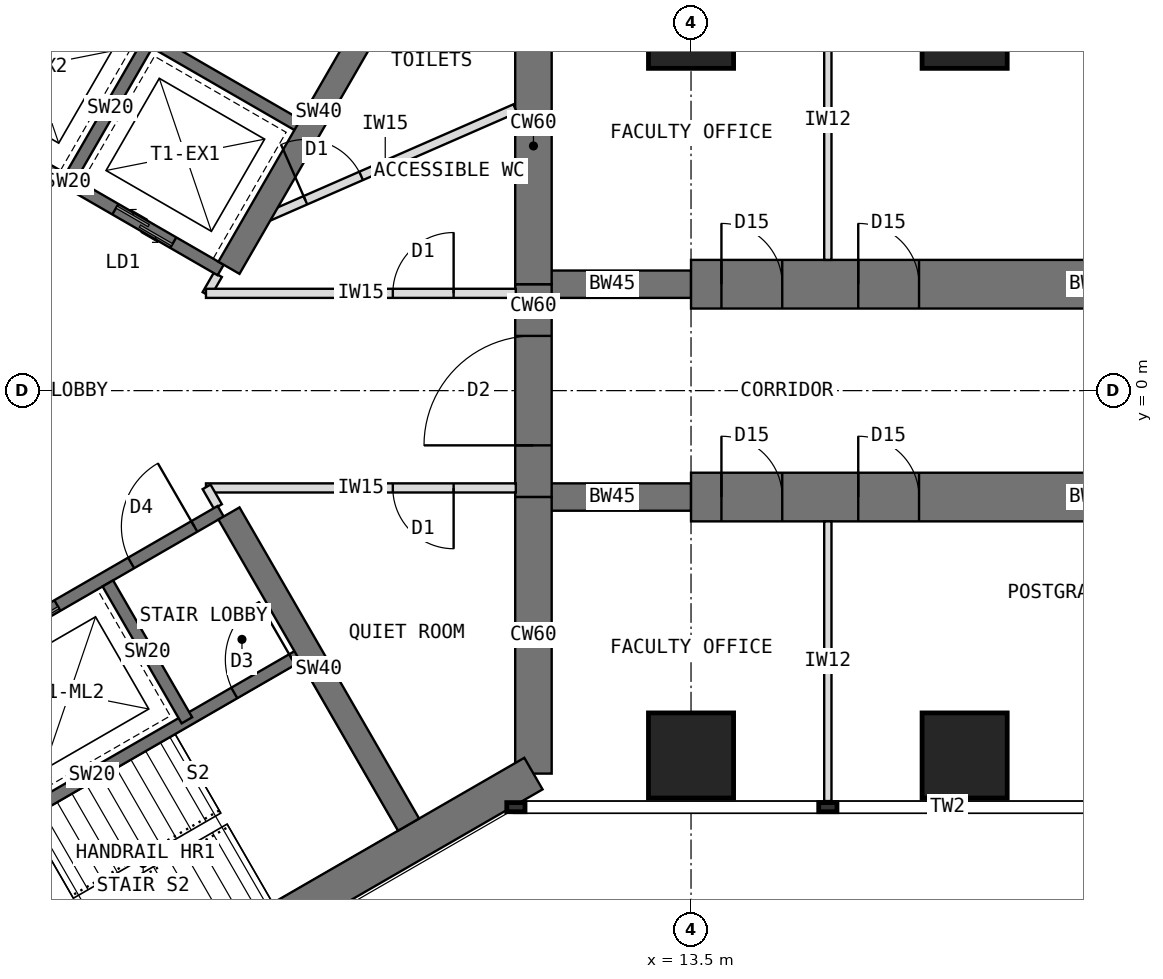
"""IFC4 building model, lengths in metres.
Left out: names, types, materials, properties, quantities, classifications, styles, units other than length and angle.
Written with IfcOpenShell. Run it as: python <this file> out.ifc"""

import sys

from ifc_helpers import new_model, si_unit, direction, frame, frame_2d, origin, origin_2d, place, context, subcontext, project, spatial, rectangle, extrude, element, fill, save


model = new_model("IFC4")
c1 = context("Model", 3, precision=1e-05, world=origin(), true_north=direction((0.0, 1.0)))
c2 = subcontext(c1, "Body", "Model", "MODEL_VIEW")
j1 = project(units=[si_unit("LENGTHUNIT", "METRE"), si_unit("PLANEANGLEUNIT", "RADIAN")], contexts=[c1])
p1 = place(None, origin())
s1 = spatial("IfcSite", under=j1, at=p1, CompositionType="ELEMENT")
p2 = place(p1, origin())
s2 = spatial("IfcBuilding", under=s1, at=p2, CompositionType="ELEMENT")
p3 = place(p2, frame((0.0, 0.0, 97.5)))
s3 = spatial("IfcBuildingStorey", under=s2, at=p3, CompositionType="ELEMENT", Elevation=97.5)
p4 = place(p3, frame((10.908, -6.298, 0.0), z_axis=(0.0, 0.0, 1.0), x_axis=(0.0, 1.0, 0.0)))
e1 = element("IfcWall", 1, at=p4, inside=s3, PredefinedType="SHEAR", context=c2, shape_type="SweptSolid", body=[
    extrude(rectangle(XDim=4.548, YDim=0.6, at=frame_2d((2.274, 0.0))), origin(), (0.0, 0.0, 1.0), 4.0),
])
p5 = place(p3, frame((10.908, -1.75, 0.0), z_axis=(0.0, 0.0, 1.0), x_axis=(0.0, 1.0, 0.0)))
e2 = element("IfcWall", 2, at=p5, inside=s3, PredefinedType="SHEAR", context=c2, shape_type="SweptSolid", body=[
    extrude(rectangle(XDim=3.5, YDim=0.6, at=frame_2d((1.75, 0.0))), origin(), (0.0, 0.0, 1.0), 4.0),
])
p6 = place(p5, frame((0.85, 0.0, 0.0)))
e3 = element("IfcOpeningElement", 3, at=p6, cuts=e2, PredefinedType="OPENING", context=c2, shape_type="SweptSolid", body=[
    extrude(rectangle(XDim=1.8, YDim=2.1, at=frame_2d((0.9, 1.05))), frame((0.0, 0.31, 0.0), z_axis=(0.0, -1.0, 0.0), x_axis=(1.0, 0.0, 0.0)), (0.0, 0.0, 1.0), 0.62),
])
p7 = place(p3, frame((10.908, 1.75, 0.0), z_axis=(0.0, 0.0, 1.0), x_axis=(0.0, 1.0, 0.0)))
e4 = element("IfcWall", 4, at=p7, inside=s3, PredefinedType="SHEAR", context=c2, shape_type="SweptSolid", body=[
    extrude(rectangle(XDim=4.548, YDim=0.6, at=frame_2d((2.274, 0.0))), origin(), (0.0, 0.0, 1.0), 4.0),
])
p8 = place(p3, frame((0.0, -12.596, 0.0), z_axis=(0.0, 0.0, 1.0), x_axis=(0.866021940709, 0.500005998175, 0.0)))
e5 = element("IfcWall", 5, at=p8, inside=s3, PredefinedType="SHEAR", context=c2, shape_type="SweptSolid", body=[
    extrude(rectangle(XDim=12.596, YDim=0.6, at=frame_2d((6.298, 0.0))), origin(), (0.0, 0.0, 1.0), 4.0),
])
p9 = place(p3, frame((10.908, 1.75, 0.0), z_axis=(0.0, 0.0, 1.0), x_axis=(1.0, 0.0, 0.0)))
e6 = element("IfcWall", 6, at=p9, inside=s3, PredefinedType="SHEAR", context=c2, shape_type="SweptSolid", body=[
    extrude(rectangle(XDim=2.592, YDim=0.45, at=frame_2d((1.296, 0.0))), origin(), (0.0, 0.0, 1.0), 4.0),
])
p10 = place(p3, frame((13.5, 1.75, 0.0), z_axis=(0.0, 0.0, 1.0), x_axis=(1.0, 0.0, 0.0)))
e7 = element("IfcWall", 7, at=p10, inside=s3, PredefinedType="SHEAR", context=c2, shape_type="SweptSolid", body=[
    extrude(rectangle(XDim=13.2, YDim=0.8, at=frame_2d((6.6, 0.0))), origin(), (0.0, 0.0, 1.0), 4.0),
])
p11 = place(p10, frame((0.5, 0.0, 0.0)))
e8 = element("IfcOpeningElement", 8, at=p11, cuts=e7, PredefinedType="OPENING", context=c2, shape_type="SweptSolid", body=[
    extrude(rectangle(XDim=1.0, YDim=2.1, at=frame_2d((0.5, 1.05))), frame((0.0, 0.41, 0.0), z_axis=(0.0, -1.0, 0.0), x_axis=(1.0, 0.0, 0.0)), (0.0, 0.0, 1.0), 0.82),
])
p12 = place(p10, frame((2.75, 0.0, 0.0)))
e9 = element("IfcOpeningElement", 9, at=p12, cuts=e7, PredefinedType="OPENING", context=c2, shape_type="SweptSolid", body=[
    extrude(rectangle(XDim=1.0, YDim=2.1, at=frame_2d((0.5, 1.05))), frame((0.0, 0.41, 0.0), z_axis=(0.0, -1.0, 0.0), x_axis=(1.0, 0.0, 0.0)), (0.0, 0.0, 1.0), 0.82),
])
p13 = place(p3, frame((10.908, -1.75, 0.0), z_axis=(0.0, 0.0, 1.0), x_axis=(1.0, 0.0, 0.0)))
e10 = element("IfcWall", 10, at=p13, inside=s3, PredefinedType="SHEAR", context=c2, shape_type="SweptSolid", body=[
    extrude(rectangle(XDim=2.592, YDim=0.45, at=frame_2d((1.296, 0.0))), origin(), (0.0, 0.0, 1.0), 4.0),
])
p14 = place(p3, frame((13.5, -1.75, 0.0), z_axis=(0.0, 0.0, 1.0), x_axis=(1.0, 0.0, 0.0)))
e11 = element("IfcWall", 11, at=p14, inside=s3, PredefinedType="SHEAR", context=c2, shape_type="SweptSolid", body=[
    extrude(rectangle(XDim=13.2, YDim=0.8, at=frame_2d((6.6, 0.0))), origin(), (0.0, 0.0, 1.0), 4.0),
])
p15 = place(p14, frame((0.5, 0.0, 0.0)))
e12 = element("IfcOpeningElement", 12, at=p15, cuts=e11, PredefinedType="OPENING", context=c2, shape_type="SweptSolid", body=[
    extrude(rectangle(XDim=1.0, YDim=2.1, at=frame_2d((0.5, 1.05))), frame((0.0, 0.41, 0.0), z_axis=(0.0, -1.0, 0.0), x_axis=(1.0, 0.0, 0.0)), (0.0, 0.0, 1.0), 0.82),
])
p16 = place(p14, frame((2.75, 0.0, 0.0)))
e13 = element("IfcOpeningElement", 13, at=p16, cuts=e11, PredefinedType="OPENING", context=c2, shape_type="SweptSolid", body=[
    extrude(rectangle(XDim=1.0, YDim=2.1, at=frame_2d((0.5, 1.05))), frame((0.0, 0.41, 0.0), z_axis=(0.0, -1.0, 0.0), x_axis=(1.0, 0.0, 0.0)), (0.0, 0.0, 1.0), 0.82),
])
for number, where, z_axis, x_axis in (
    (14, (13.5, 6.0, 0.0), (0.0, 0.0, 1.0), (1.0, 0.0, 0.0)),
    (15, (13.5, -6.0, 0.0), (0.0, 0.0, 1.0), (1.0, 0.0, 0.0)),
    (16, (18.0, 6.0, 0.0), (0.0, 0.0, 1.0), (1.0, 0.0, 0.0)),
    (17, (18.0, -6.0, 0.0), (0.0, 0.0, 1.0), (1.0, 0.0, 0.0)),
):
    element("IfcColumn", number, at=place(p3, frame(where, z_axis=z_axis, x_axis=x_axis)), inside=s3, PredefinedType="COLUMN", context=c2, shape_type="SweptSolid", body=[
        extrude(rectangle(XDim=1.4, YDim=1.4, at=origin_2d()), origin(), (0.0, 0.0, 1.0), 4.0),
    ])
p17 = place(p3, frame((5.764, 1.984, 0.0), z_axis=(0.0, 0.0, 1.0), x_axis=(-0.866026010844, 0.49999894854, 0.0)))
e18 = element("IfcWall", 18, at=p17, inside=s3, PredefinedType="SHEAR", context=c2, shape_type="SweptSolid", body=[
    extrude(rectangle(XDim=8.0, YDim=0.2, at=frame_2d((4.0, 0.0))), origin(), (0.0, 0.0, 1.0), 4.0),
])
p18 = place(p17, frame((6.3, 0.0, 0.0)))
e19 = element("IfcOpeningElement", 19, at=p18, cuts=e18, PredefinedType="OPENING", context=c2, shape_type="SweptSolid", body=[
    extrude(rectangle(XDim=1.2, YDim=2.1, at=frame_2d((0.6, 1.05))), frame((0.0, 0.11, 0.0), z_axis=(0.0, -1.0, 0.0), x_axis=(1.0, 0.0, 0.0)), (0.0, 0.0, 1.0), 0.22),
])
p19 = place(p17, frame((0.9, 0.0, 0.0)))
e20 = element("IfcOpeningElement", 20, at=p19, cuts=e18, PredefinedType="OPENING", context=c2, shape_type="SweptSolid", body=[
    extrude(rectangle(XDim=1.1, YDim=2.2, at=frame_2d((0.55, 1.1))), frame((0.0, 0.11, 0.0), z_axis=(0.0, -1.0, 0.0), x_axis=(1.0, 0.0, 0.0)), (0.0, 0.0, 1.0), 0.22),
])
p20 = place(p17, frame((3.8, 0.0, 0.0)))
e21 = element("IfcOpeningElement", 21, at=p20, cuts=e18, PredefinedType="OPENING", context=c2, shape_type="SweptSolid", body=[
    extrude(rectangle(XDim=1.1, YDim=2.2, at=frame_2d((0.55, 1.1))), frame((0.0, 0.11, 0.0), z_axis=(0.0, -1.0, 0.0), x_axis=(1.0, 0.0, 0.0)), (0.0, 0.0, 1.0), 0.22),
])
p21 = place(p3, frame((3.303, 3.52, 0.0), z_axis=(0.0, 0.0, 1.0), x_axis=(0.499936506574, 0.866062058628, 0.0)))
e22 = element("IfcWall", 22, at=p21, inside=s3, PredefinedType="SHEAR", context=c2, shape_type="SweptSolid", body=[
    extrude(rectangle(XDim=2.6, YDim=0.2, at=frame_2d((1.3, 0.0))), origin(), (0.0, 0.0, 1.0), 4.0),
])
p22 = place(p3, frame((7.114, 4.322, 0.0), z_axis=(0.0, 0.0, 1.0), x_axis=(-0.866026010844, 0.49999894854, 0.0)))
e23 = element("IfcWall", 23, at=p22, inside=s3, PredefinedType="SHEAR", context=c2, shape_type="SweptSolid", body=[
    extrude(rectangle(XDim=8.0, YDim=0.2, at=frame_2d((4.0, 0.0))), origin(), (0.0, 0.0, 1.0), 4.0),
])
p23 = place(p22, frame((6.8, 0.0, 0.0)))
e24 = element("IfcOpeningElement", 24, at=p23, cuts=e23, PredefinedType="OPENING", context=c2, shape_type="SweptSolid", body=[
    extrude(rectangle(XDim=0.9, YDim=2.1, at=frame_2d((0.45, 1.05))), frame((0.0, 0.11, 0.0), z_axis=(0.0, -1.0, 0.0), x_axis=(1.0, 0.0, 0.0)), (0.0, 0.0, 1.0), 0.22),
])
p24 = place(p3, frame((5.901, 2.02, 0.0), z_axis=(0.0, 0.0, 1.0), x_axis=(0.500027676417, 0.866009424208, 0.0)))
e25 = element("IfcWall", 25, at=p24, inside=s3, PredefinedType="SHEAR", context=c2, shape_type="SweptSolid", body=[
    extrude(rectangle(XDim=5.908, YDim=0.4, at=frame_2d((2.954, 0.0))), origin(), (0.0, 0.0, 1.0), 4.0),
])
p25 = place(p3, frame((-1.164, -5.984, 0.0), z_axis=(0.0, 0.0, 1.0), x_axis=(0.866026010844, 0.49999894854, 0.0)))
e26 = element("IfcWall", 26, at=p25, inside=s3, PredefinedType="SHEAR", context=c2, shape_type="SweptSolid", body=[
    extrude(rectangle(XDim=8.0, YDim=0.2, at=frame_2d((4.0, 0.0))), origin(), (0.0, 0.0, 1.0), 4.0),
])
p26 = place(p25, frame((6.3, 0.0, 0.0)))
e27 = element("IfcOpeningElement", 27, at=p26, cuts=e26, PredefinedType="OPENING", context=c2, shape_type="SweptSolid", body=[
    extrude(rectangle(XDim=1.2, YDim=2.1, at=frame_2d((0.6, 1.05))), frame((0.0, 0.11, 0.0), z_axis=(0.0, -1.0, 0.0), x_axis=(1.0, 0.0, 0.0)), (0.0, 0.0, 1.0), 0.22),
])
p27 = place(p25, frame((0.9, 0.0, 0.0)))
e28 = element("IfcOpeningElement", 28, at=p27, cuts=e26, PredefinedType="OPENING", context=c2, shape_type="SweptSolid", body=[
    extrude(rectangle(XDim=1.1, YDim=2.2, at=frame_2d((0.55, 1.1))), frame((0.0, 0.11, 0.0), z_axis=(0.0, -1.0, 0.0), x_axis=(1.0, 0.0, 0.0)), (0.0, 0.0, 1.0), 0.22),
])
p28 = place(p25, frame((3.8, 0.0, 0.0)))
e29 = element("IfcOpeningElement", 29, at=p28, cuts=e26, PredefinedType="OPENING", context=c2, shape_type="SweptSolid", body=[
    extrude(rectangle(XDim=1.1, YDim=2.2, at=frame_2d((0.55, 1.1))), frame((0.0, 0.11, 0.0), z_axis=(0.0, -1.0, 0.0), x_axis=(1.0, 0.0, 0.0)), (0.0, 0.0, 1.0), 0.22),
])
p29 = place(p3, frame((3.909, -3.17, 0.0), z_axis=(0.0, 0.0, 1.0), x_axis=(0.49997716683, -0.86603858612, 0.0)))
e30 = element("IfcWall", 30, at=p29, inside=s3, PredefinedType="SHEAR", context=c2, shape_type="SweptSolid", body=[
    extrude(rectangle(XDim=2.6, YDim=0.2, at=frame_2d((1.3, 0.0))), origin(), (0.0, 0.0, 1.0), 4.0),
])
p30 = place(p3, frame((0.186, -8.322, 0.0), z_axis=(0.0, 0.0, 1.0), x_axis=(0.866026010844, 0.49999894854, 0.0)))
e31 = element("IfcWall", 31, at=p30, inside=s3, PredefinedType="SHEAR", context=c2, shape_type="SweptSolid", body=[
    extrude(rectangle(XDim=8.0, YDim=0.2, at=frame_2d((4.0, 0.0))), origin(), (0.0, 0.0, 1.0), 4.0),
])
p31 = place(p30, frame((6.7, 0.0, 0.0)))
e32 = element("IfcOpeningElement", 32, at=p31, cuts=e31, PredefinedType="OPENING", context=c2, shape_type="SweptSolid", body=[
    extrude(rectangle(XDim=1.1, YDim=2.1, at=frame_2d((0.55, 1.05))), frame((0.0, 0.11, 0.0), z_axis=(0.0, -1.0, 0.0), x_axis=(1.0, 0.0, 0.0)), (0.0, 0.0, 1.0), 0.22),
])
p32 = place(p3, frame((5.901, -2.02, 0.0), z_axis=(0.0, 0.0, 1.0), x_axis=(0.500027676417, -0.866009424208, 0.0)))
e33 = element("IfcWall", 33, at=p32, inside=s3, PredefinedType="SHEAR", context=c2, shape_type="SweptSolid", body=[
    extrude(rectangle(XDim=5.908, YDim=0.4, at=frame_2d((2.954, 0.0))), origin(), (0.0, 0.0, 1.0), 4.0),
])
for number, where, z_axis, x_axis in (
    (34, (15.75, 2.15, 0.0), (0.0, 0.0, 1.0), (0.0, 1.0, 0.0)),
    (35, (15.75, -2.15, 0.0), (0.0, 0.0, 1.0), (0.0, -1.0, 0.0)),
):
    element("IfcWall", number, at=place(p3, frame(where, z_axis=z_axis, x_axis=x_axis)), inside=s3, PredefinedType="PARTITIONING", context=c2, shape_type="SweptSolid", body=[
        extrude(rectangle(XDim=4.6, YDim=0.12, at=frame_2d((2.3, 0.0))), origin(), (0.0, 0.0, 1.0), 3.8),
    ])
p33 = place(p3, frame((5.719, 1.906, 0.0), z_axis=(0.0, 0.0, 1.0), x_axis=(-0.499590185398, -0.866261881104, 0.0)))
e36 = element("IfcWall", 36, at=p33, inside=s3, PredefinedType="PARTITIONING", context=c2, shape_type="SweptSolid", body=[
    extrude(rectangle(XDim=0.373, YDim=0.15, at=frame_2d((0.187, 0.0))), origin(), (0.0, 0.0, 1.0), 3.8),
])
p34 = place(p3, frame((5.523, 1.6, 0.0), z_axis=(0.0, 0.0, 1.0), x_axis=(1.0, 0.0, 0.0)))
e37 = element("IfcWall", 37, at=p34, inside=s3, PredefinedType="PARTITIONING", context=c2, shape_type="SweptSolid", body=[
    extrude(rectangle(XDim=5.096, YDim=0.15, at=frame_2d((2.548, 0.0))), origin(), (0.0, 0.0, 1.0), 3.8),
])
p35 = place(p34, frame((3.073, 0.0, 0.0)))
e38 = element("IfcOpeningElement", 38, at=p35, cuts=e37, PredefinedType="OPENING", context=c2, shape_type="SweptSolid", body=[
    extrude(rectangle(XDim=1.0, YDim=2.1, at=frame_2d((0.5, 1.05))), frame((0.0, 0.085, 0.0), z_axis=(0.0, -1.0, 0.0), x_axis=(1.0, 0.0, 0.0)), (0.0, 0.0, 1.0), 0.17),
])
p36 = place(p3, frame((10.618, -1.6, 0.0), z_axis=(0.0, 0.0, 1.0), x_axis=(-1.0, 0.0, 0.0)))
e39 = element("IfcWall", 39, at=p36, inside=s3, PredefinedType="PARTITIONING", context=c2, shape_type="SweptSolid", body=[
    extrude(rectangle(XDim=5.096, YDim=0.15, at=frame_2d((2.548, 0.0))), origin(), (0.0, 0.0, 1.0), 3.8),
])
p37 = place(p36, frame((1.023, 0.0, 0.0)))
e40 = element("IfcOpeningElement", 40, at=p37, cuts=e39, PredefinedType="OPENING", context=c2, shape_type="SweptSolid", body=[
    extrude(rectangle(XDim=1.0, YDim=2.1, at=frame_2d((0.5, 1.05))), frame((0.0, 0.085, 0.0), z_axis=(0.0, -1.0, 0.0), x_axis=(1.0, 0.0, 0.0)), (0.0, 0.0, 1.0), 0.17),
])
p38 = place(p3, frame((5.533, -1.583, 0.0), z_axis=(0.0, 0.0, 1.0), x_axis=(0.499590185398, -0.866261881104, 0.0)))
e41 = element("IfcWall", 41, at=p38, inside=s3, PredefinedType="PARTITIONING", context=c2, shape_type="SweptSolid", body=[
    extrude(rectangle(XDim=0.373, YDim=0.15, at=frame_2d((0.187, 0.0))), origin(), (0.0, 0.0, 1.0), 3.8),
])
p39 = place(p3, frame((6.333, 2.77, 0.0), z_axis=(0.0, 0.0, 1.0), x_axis=(0.916207765353, 0.400703544664, 0.0)))
e42 = element("IfcWall", 42, at=p39, inside=s3, PredefinedType="PARTITIONING", context=c2, shape_type="SweptSolid", body=[
    extrude(rectangle(XDim=4.666, YDim=0.15, at=frame_2d((2.333, 0.0))), origin(), (0.0, 0.0, 1.0), 3.8),
])
p40 = place(p39, frame((0.9, 0.0, 0.0)))
e43 = element("IfcOpeningElement", 43, at=p40, cuts=e42, PredefinedType="OPENING", context=c2, shape_type="SweptSolid", body=[
    extrude(rectangle(XDim=1.0, YDim=2.1, at=frame_2d((0.5, 1.05))), frame((0.0, 0.085, 0.0), z_axis=(0.0, -1.0, 0.0), x_axis=(1.0, 0.0, 0.0)), (0.0, 0.0, 1.0), 0.17),
])
p41 = place(p19, origin())
e44 = element("IfcDoor", 44, at=p41, inside=s3, OperationType="DOUBLE_DOOR_SLIDING", PredefinedType="DOOR", context=c2, shape_type="SweptSolid", body=[
    extrude(rectangle(XDim=1.1, YDim=2.2, at=frame_2d((0.55, 1.1))), frame((0.0, 0.025, 0.0), z_axis=(0.0, -1.0, 0.0), x_axis=(1.0, 0.0, 0.0)), (0.0, 0.0, 1.0), 0.05),
])
fill(e20, e44)
p42 = place(p26, origin())
e45 = element("IfcDoor", 45, at=p42, inside=s3, OperationType="SINGLE_SWING_RIGHT", PredefinedType="DOOR", context=c2, shape_type="SweptSolid", body=[
    extrude(rectangle(XDim=1.2, YDim=2.1, at=frame_2d((0.6, 1.05))), frame((0.0, 0.025, 0.0), z_axis=(0.0, -1.0, 0.0), x_axis=(1.0, 0.0, 0.0)), (0.0, 0.0, 1.0), 0.05),
])
fill(e27, e45)
p43 = place(p28, origin())
e46 = element("IfcDoor", 46, at=p43, inside=s3, OperationType="DOUBLE_DOOR_SLIDING", PredefinedType="DOOR", context=c2, shape_type="SweptSolid", body=[
    extrude(rectangle(XDim=1.1, YDim=2.2, at=frame_2d((0.55, 1.1))), frame((0.0, 0.025, 0.0), z_axis=(0.0, -1.0, 0.0), x_axis=(1.0, 0.0, 0.0)), (0.0, 0.0, 1.0), 0.05),
])
fill(e29, e46)
p44 = place(p31, origin())
e47 = element("IfcDoor", 47, at=p44, inside=s3, OperationType="SINGLE_SWING_RIGHT", PredefinedType="DOOR", context=c2, shape_type="SweptSolid", body=[
    extrude(rectangle(XDim=1.1, YDim=2.1, at=frame_2d((0.55, 1.05))), frame((0.0, 0.025, 0.0), z_axis=(0.0, -1.0, 0.0), x_axis=(1.0, 0.0, 0.0)), (0.0, 0.0, 1.0), 0.05),
])
fill(e32, e47)
p45 = place(p6, origin())
e48 = element("IfcDoor", 48, at=p45, inside=s3, OperationType="DOUBLE_DOOR_DOUBLE_SWING", PredefinedType="DOOR", context=c2, shape_type="SweptSolid", body=[
    extrude(rectangle(XDim=1.72, YDim=2.06, at=frame_2d((0.9, 1.03))), frame((0.0, 0.025, 0.0), z_axis=(0.0, -1.0, 0.0), x_axis=(1.0, 0.0, 0.0)), (0.0, 0.0, 1.0), 0.05),
    extrude(rectangle(XDim=0.04, YDim=2.1, at=frame_2d((0.02, 1.05))), frame((0.0, 0.3, 0.0), z_axis=(0.0, -1.0, 0.0), x_axis=(1.0, 0.0, 0.0)), (0.0, 0.0, 1.0), 0.6),
    extrude(rectangle(XDim=0.04, YDim=2.1, at=frame_2d((1.78, 1.05))), frame((0.0, 0.3, 0.0), z_axis=(0.0, -1.0, 0.0), x_axis=(1.0, 0.0, 0.0)), (0.0, 0.0, 1.0), 0.6),
    extrude(rectangle(XDim=1.72, YDim=0.04, at=frame_2d((0.9, 2.08))), frame((0.0, 0.3, 0.0), z_axis=(0.0, -1.0, 0.0), x_axis=(1.0, 0.0, 0.0)), (0.0, 0.0, 1.0), 0.6),
])
fill(e3, e48)
p46 = place(p37, origin())
e49 = element("IfcDoor", 49, at=p46, inside=s3, OperationType="SINGLE_SWING_LEFT", PredefinedType="DOOR", context=c2, shape_type="SweptSolid", body=[
    extrude(rectangle(XDim=1.0, YDim=2.1, at=frame_2d((0.5, 1.05))), frame((0.0, 0.025, 0.0), z_axis=(0.0, -1.0, 0.0), x_axis=(1.0, 0.0, 0.0)), (0.0, 0.0, 1.0), 0.05),
])
fill(e40, e49)
p47 = place(p35, origin())
e50 = element("IfcDoor", 50, at=p47, inside=s3, OperationType="SINGLE_SWING_RIGHT", PredefinedType="DOOR", context=c2, shape_type="SweptSolid", body=[
    extrude(rectangle(XDim=1.0, YDim=2.1, at=frame_2d((0.5, 1.05))), frame((0.0, 0.025, 0.0), z_axis=(0.0, -1.0, 0.0), x_axis=(1.0, 0.0, 0.0)), (0.0, 0.0, 1.0), 0.05),
])
fill(e38, e50)
p48 = place(p40, origin())
e51 = element("IfcDoor", 51, at=p48, inside=s3, OperationType="SINGLE_SWING_LEFT", PredefinedType="DOOR", context=c2, shape_type="SweptSolid", body=[
    extrude(rectangle(XDim=1.0, YDim=2.1, at=frame_2d((0.5, 1.05))), frame((0.0, 0.025, 0.0), z_axis=(0.0, -1.0, 0.0), x_axis=(1.0, 0.0, 0.0)), (0.0, 0.0, 1.0), 0.05),
])
fill(e43, e51)
p49 = place(p11, origin())
e52 = element("IfcDoor", 52, at=p49, inside=s3, OperationType="SINGLE_SWING_LEFT", PredefinedType="DOOR", context=c2, shape_type="SweptSolid", body=[
    extrude(rectangle(XDim=0.92, YDim=2.06, at=frame_2d((0.5, 1.03))), frame((0.0, 0.025, 0.0), z_axis=(0.0, -1.0, 0.0), x_axis=(1.0, 0.0, 0.0)), (0.0, 0.0, 1.0), 0.05),
    extrude(rectangle(XDim=0.04, YDim=2.1, at=frame_2d((0.02, 1.05))), frame((0.0, 0.4, 0.0), z_axis=(0.0, -1.0, 0.0), x_axis=(1.0, 0.0, 0.0)), (0.0, 0.0, 1.0), 0.8),
    extrude(rectangle(XDim=0.04, YDim=2.1, at=frame_2d((0.98, 1.05))), frame((0.0, 0.4, 0.0), z_axis=(0.0, -1.0, 0.0), x_axis=(1.0, 0.0, 0.0)), (0.0, 0.0, 1.0), 0.8),
    extrude(rectangle(XDim=0.92, YDim=0.04, at=frame_2d((0.5, 2.08))), frame((0.0, 0.4, 0.0), z_axis=(0.0, -1.0, 0.0), x_axis=(1.0, 0.0, 0.0)), (0.0, 0.0, 1.0), 0.8),
])
fill(e8, e52)
p50 = place(p12, origin())
e53 = element("IfcDoor", 53, at=p50, inside=s3, OperationType="SINGLE_SWING_LEFT", PredefinedType="DOOR", context=c2, shape_type="SweptSolid", body=[
    extrude(rectangle(XDim=0.92, YDim=2.06, at=frame_2d((0.5, 1.03))), frame((0.0, 0.025, 0.0), z_axis=(0.0, -1.0, 0.0), x_axis=(1.0, 0.0, 0.0)), (0.0, 0.0, 1.0), 0.05),
    extrude(rectangle(XDim=0.04, YDim=2.1, at=frame_2d((0.02, 1.05))), frame((0.0, 0.4, 0.0), z_axis=(0.0, -1.0, 0.0), x_axis=(1.0, 0.0, 0.0)), (0.0, 0.0, 1.0), 0.8),
    extrude(rectangle(XDim=0.04, YDim=2.1, at=frame_2d((0.98, 1.05))), frame((0.0, 0.4, 0.0), z_axis=(0.0, -1.0, 0.0), x_axis=(1.0, 0.0, 0.0)), (0.0, 0.0, 1.0), 0.8),
    extrude(rectangle(XDim=0.92, YDim=0.04, at=frame_2d((0.5, 2.08))), frame((0.0, 0.4, 0.0), z_axis=(0.0, -1.0, 0.0), x_axis=(1.0, 0.0, 0.0)), (0.0, 0.0, 1.0), 0.8),
])
fill(e9, e53)
p51 = place(p15, origin())
e54 = element("IfcDoor", 54, at=p51, inside=s3, OperationType="SINGLE_SWING_LEFT", PredefinedType="DOOR", context=c2, shape_type="SweptSolid", body=[
    extrude(rectangle(XDim=0.92, YDim=2.06, at=frame_2d((0.5, 1.03))), frame((0.0, 0.025, 0.0), z_axis=(0.0, -1.0, 0.0), x_axis=(1.0, 0.0, 0.0)), (0.0, 0.0, 1.0), 0.05),
    extrude(rectangle(XDim=0.04, YDim=2.1, at=frame_2d((0.02, 1.05))), frame((0.0, 0.4, 0.0), z_axis=(0.0, -1.0, 0.0), x_axis=(1.0, 0.0, 0.0)), (0.0, 0.0, 1.0), 0.8),
    extrude(rectangle(XDim=0.04, YDim=2.1, at=frame_2d((0.98, 1.05))), frame((0.0, 0.4, 0.0), z_axis=(0.0, -1.0, 0.0), x_axis=(1.0, 0.0, 0.0)), (0.0, 0.0, 1.0), 0.8),
    extrude(rectangle(XDim=0.92, YDim=0.04, at=frame_2d((0.5, 2.08))), frame((0.0, 0.4, 0.0), z_axis=(0.0, -1.0, 0.0), x_axis=(1.0, 0.0, 0.0)), (0.0, 0.0, 1.0), 0.8),
])
fill(e12, e54)
p52 = place(p16, origin())
e55 = element("IfcDoor", 55, at=p52, inside=s3, OperationType="SINGLE_SWING_LEFT", PredefinedType="DOOR", context=c2, shape_type="SweptSolid", body=[
    extrude(rectangle(XDim=0.92, YDim=2.06, at=frame_2d((0.5, 1.03))), frame((0.0, 0.025, 0.0), z_axis=(0.0, -1.0, 0.0), x_axis=(1.0, 0.0, 0.0)), (0.0, 0.0, 1.0), 0.05),
    extrude(rectangle(XDim=0.04, YDim=2.1, at=frame_2d((0.02, 1.05))), frame((0.0, 0.4, 0.0), z_axis=(0.0, -1.0, 0.0), x_axis=(1.0, 0.0, 0.0)), (0.0, 0.0, 1.0), 0.8),
    extrude(rectangle(XDim=0.04, YDim=2.1, at=frame_2d((0.98, 1.05))), frame((0.0, 0.4, 0.0), z_axis=(0.0, -1.0, 0.0), x_axis=(1.0, 0.0, 0.0)), (0.0, 0.0, 1.0), 0.8),
    extrude(rectangle(XDim=0.92, YDim=0.04, at=frame_2d((0.5, 2.08))), frame((0.0, 0.4, 0.0), z_axis=(0.0, -1.0, 0.0), x_axis=(1.0, 0.0, 0.0)), (0.0, 0.0, 1.0), 0.8),
])
fill(e13, e55)
save(model, sys.argv[1])
